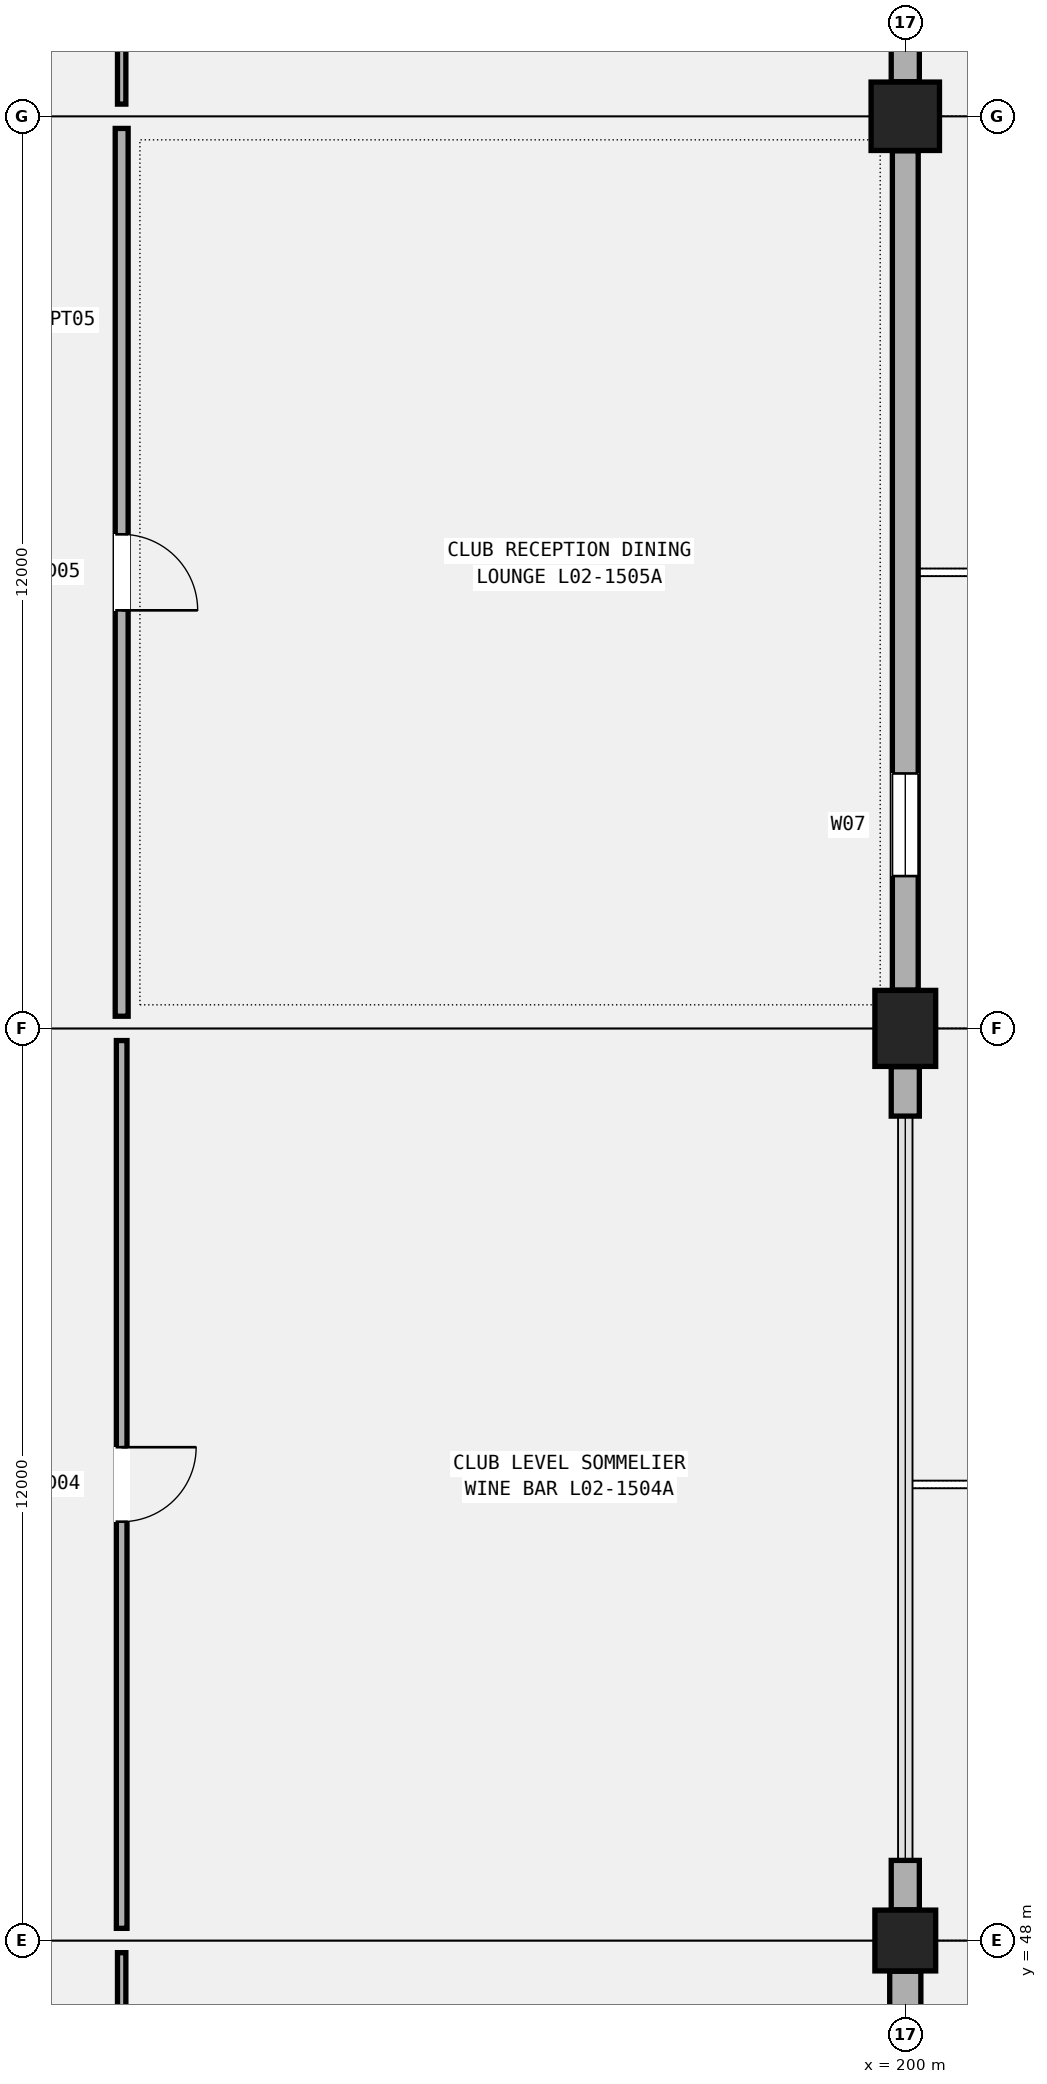
"""IFC4 building model, lengths in metres.
Left out: names, types, materials, properties, quantities, classifications, styles, units other than length and angle.
Written with IfcOpenShell. Run it as: python <this file> out.ifc"""

import sys

from ifc_helpers import new_model, si_unit, direction, frame, frame_2d, origin, origin_2d, place, context, subcontext, project, spatial, rectangle, extrude, element, fill, save


model = new_model("IFC4")
c1 = context("Model", 3, precision=1e-05, world=origin(), true_north=direction((0.0, 1.0)))
c2 = subcontext(c1, "Body", "Model", "MODEL_VIEW")
j1 = project(units=[si_unit("LENGTHUNIT", "METRE"), si_unit("PLANEANGLEUNIT", "RADIAN")], contexts=[c1])
p1 = place(None, origin())
s1 = spatial("IfcSite", under=j1, at=p1, CompositionType="ELEMENT")
p2 = place(p1, origin())
s2 = spatial("IfcBuilding", under=s1, at=p2, CompositionType="ELEMENT")
p3 = place(p2, frame((0.0, 0.0, 10.2)))
s3 = spatial("IfcBuildingStorey", under=s2, at=p3, CompositionType="ELEMENT", Elevation=10.2)
p4 = place(p3, frame((200.0, 48.0, 0.0), z_axis=(0.0, 0.0, 1.0), x_axis=(1.0, 0.0, 0.0)))
e1 = element("IfcColumn", 1, at=p4, inside=s3, PredefinedType="COLUMN", context=c2, shape_type="SweptSolid", body=[
    extrude(rectangle(XDim=0.8, YDim=0.8, at=origin_2d()), origin(), (0.0, 0.0, 1.0), 5.1),
])
p5 = place(p3, frame((200.0, 60.0, 0.0), z_axis=(0.0, 0.0, 1.0), x_axis=(1.0, 0.0, 0.0)))
e2 = element("IfcColumn", 2, at=p5, inside=s3, PredefinedType="COLUMN", context=c2, shape_type="SweptSolid", body=[
    extrude(rectangle(XDim=0.8, YDim=1.0, at=origin_2d()), origin(), (0.0, 0.0, 1.0), 5.1),
])
p6 = place(p3, frame((200.0, 72.0, 0.0), z_axis=(0.0, 0.0, 1.0), x_axis=(1.0, 0.0, 0.0)))
e3 = element("IfcColumn", 3, at=p6, inside=s3, PredefinedType="COLUMN", context=c2, shape_type="SweptSolid", body=[
    extrude(rectangle(XDim=0.9, YDim=0.9, at=origin_2d()), origin(), (0.0, 0.0, 1.0), 5.1),
])
p7 = place(p3, frame((200.0, 36.454, 0.0), z_axis=(0.0, 0.0, 1.0), x_axis=(0.0, 1.0, 0.0)))
e4 = element("IfcWall", 4, at=p7, inside=s3, PredefinedType="SOLIDWALL", context=c2, shape_type="SweptSolid", body=[
    extrude(rectangle(XDim=11.142, YDim=0.41, at=frame_2d((5.571, 0.0))), origin(), (0.0, 0.0, 1.0), 4.12),
])
p8 = place(p7, frame((1.5, 0.0, 0.95)))
e5 = element("IfcOpeningElement", 5, at=p8, cuts=e4, PredefinedType="OPENING", context=c2, shape_type="SweptSolid", body=[
    extrude(rectangle(XDim=1.2, YDim=2.3, at=frame_2d((0.6, 1.15))), frame((0.0, 0.215, 0.0), z_axis=(0.0, -1.0, 0.0), x_axis=(1.0, 0.0, 0.0)), (0.0, 0.0, 1.0), 0.43),
])
p9 = place(p3, frame((200.0, 48.404, 0.0), z_axis=(0.0, 0.0, 1.0), x_axis=(0.0, 1.0, 0.0)))
e6 = element("IfcWall", 6, at=p9, inside=s3, PredefinedType="SOLIDWALL", context=c2, shape_type="SweptSolid", body=[
    extrude(rectangle(XDim=0.65, YDim=0.37, at=frame_2d((0.325, 0.0))), origin(), (0.0, 0.0, 1.0), 4.232),
])
p10 = place(p3, frame((200.0, 58.846, 0.0), z_axis=(0.0, 0.0, 1.0), x_axis=(0.0, 1.0, 0.0)))
e7 = element("IfcWall", 7, at=p10, inside=s3, PredefinedType="SOLIDWALL", context=c2, shape_type="SweptSolid", body=[
    extrude(rectangle(XDim=0.65, YDim=0.37, at=frame_2d((0.325, 0.0))), origin(), (0.0, 0.0, 1.0), 4.232),
])
p11 = place(p3, frame((200.0, 60.504, 0.0), z_axis=(0.0, 0.0, 1.0), x_axis=(0.0, 1.0, 0.0)))
e8 = element("IfcWall", 8, at=p11, inside=s3, PredefinedType="SOLIDWALL", context=c2, shape_type="SweptSolid", body=[
    extrude(rectangle(XDim=11.042, YDim=0.34, at=frame_2d((5.521, 0.0))), origin(), (0.0, 0.0, 1.0), 4.02),
])
p12 = place(p11, frame((1.5, 0.0, 0.95)))
e9 = element("IfcOpeningElement", 9, at=p12, cuts=e8, PredefinedType="OPENING", context=c2, shape_type="SweptSolid", body=[
    extrude(rectangle(XDim=1.35, YDim=2.0, at=frame_2d((0.675, 1.0))), frame((0.0, 0.18, 0.0), z_axis=(0.0, -1.0, 0.0), x_axis=(1.0, 0.0, 0.0)), (0.0, 0.0, 1.0), 0.36),
])
p13 = place(p3, frame((200.0, 72.454, 0.0), z_axis=(0.0, 0.0, 1.0), x_axis=(0.0, 1.0, 0.0)))
e10 = element("IfcWall", 10, at=p13, inside=s3, PredefinedType="SOLIDWALL", context=c2, shape_type="SweptSolid", body=[
    extrude(rectangle(XDim=0.65, YDim=0.37, at=frame_2d((0.325, 0.0))), origin(), (0.0, 0.0, 1.0), 4.12),
])
p14 = place(p3, frame((189.69, 38.12, 0.0), z_axis=(0.0, 0.0, 1.0), x_axis=(0.0, 1.0, 0.0)))
e11 = element("IfcWall", 11, at=p14, inside=s3, PredefinedType="PARTITIONING", context=c2, shape_type="SweptSolid", body=[
    extrude(rectangle(XDim=9.72, YDim=0.11, at=frame_2d((4.86, 0.0))), origin(), (0.0, 0.0, 1.0), 4.22),
])
p15 = place(p14, frame((5.335, 0.0, 0.0), z_axis=(0.0, 0.0, 1.0), x_axis=(-1.0, 0.0, 0.0)))
e12 = element("IfcOpeningElement", 12, at=p15, cuts=e11, PredefinedType="OPENING", context=c2, shape_type="SweptSolid", body=[
    extrude(rectangle(XDim=0.95, YDim=2.12, at=frame_2d((0.475, 1.06))), frame((0.0, 0.065, 0.0), z_axis=(0.0, -1.0, 0.0), x_axis=(1.0, 0.0, 0.0)), (0.0, 0.0, 1.0), 0.13),
])
p16 = place(p3, frame((189.69, 48.16, 0.0), z_axis=(0.0, 0.0, 1.0), x_axis=(0.0, 1.0, 0.0)))
e13 = element("IfcWall", 13, at=p16, inside=s3, PredefinedType="PARTITIONING", context=c2, shape_type="SweptSolid", body=[
    extrude(rectangle(XDim=11.68, YDim=0.14, at=frame_2d((5.84, 0.0))), origin(), (0.0, 0.0, 1.0), 4.22),
])
p17 = place(p16, frame((6.33, 0.0, 0.0), z_axis=(0.0, 0.0, 1.0), x_axis=(-1.0, 0.0, 0.0)))
e14 = element("IfcOpeningElement", 14, at=p17, cuts=e13, PredefinedType="OPENING", context=c2, shape_type="SweptSolid", body=[
    extrude(rectangle(XDim=0.98, YDim=2.1, at=frame_2d((0.49, 1.05))), frame((0.0, 0.08, 0.0), z_axis=(0.0, -1.0, 0.0), x_axis=(1.0, 0.0, 0.0)), (0.0, 0.0, 1.0), 0.16),
])
p18 = place(p3, frame((189.69, 60.16, 0.0), z_axis=(0.0, 0.0, 1.0), x_axis=(0.0, 1.0, 0.0)))
e15 = element("IfcWall", 15, at=p18, inside=s3, PredefinedType="PARTITIONING", context=c2, shape_type="SweptSolid", body=[
    extrude(rectangle(XDim=11.68, YDim=0.17, at=frame_2d((5.84, 0.0))), origin(), (0.0, 0.0, 1.0), 4.22),
])
p19 = place(p18, frame((6.34, 0.0, 0.0), z_axis=(0.0, 0.0, 1.0), x_axis=(-1.0, 0.0, 0.0)))
e16 = element("IfcOpeningElement", 16, at=p19, cuts=e15, PredefinedType="OPENING", context=c2, shape_type="SweptSolid", body=[
    extrude(rectangle(XDim=1.0, YDim=2.14, at=frame_2d((0.5, 1.07))), frame((0.0, 0.095, 0.0), z_axis=(0.0, -1.0, 0.0), x_axis=(1.0, 0.0, 0.0)), (0.0, 0.0, 1.0), 0.19),
])
p20 = place(p3, frame((189.69, 72.16, 0.0), z_axis=(0.0, 0.0, 1.0), x_axis=(0.0, 1.0, 0.0)))
e17 = element("IfcWall", 17, at=p20, inside=s3, PredefinedType="PARTITIONING", context=c2, shape_type="SweptSolid", body=[
    extrude(rectangle(XDim=11.68, YDim=0.11, at=frame_2d((5.84, 0.0))), origin(), (0.0, 0.0, 1.0), 4.22),
])
p21 = place(p20, frame((6.355, 0.0, 0.0), z_axis=(0.0, 0.0, 1.0), x_axis=(-1.0, 0.0, 0.0)))
e18 = element("IfcOpeningElement", 18, at=p21, cuts=e17, PredefinedType="OPENING", context=c2, shape_type="SweptSolid", body=[
    extrude(rectangle(XDim=1.03, YDim=2.12, at=frame_2d((0.515, 1.06))), frame((0.0, 0.065, 0.0), z_axis=(0.0, -1.0, 0.0), x_axis=(1.0, 0.0, 0.0)), (0.0, 0.0, 1.0), 0.13),
])
p22 = place(p12, origin())
e19 = element("IfcWindow", 19, at=p22, inside=s3, PartitioningType="SINGLE_PANEL", PredefinedType="WINDOW", context=c2, shape_type="SweptSolid", body=[
    extrude(rectangle(XDim=1.35, YDim=2.0, at=frame_2d((0.675, 1.0))), frame((0.0, 0.03, 0.0), z_axis=(0.0, -1.0, 0.0), x_axis=(1.0, 0.0, 0.0)), (0.0, 0.0, 1.0), 0.06),
])
fill(e9, e19)
p23 = place(p17, origin())
e20 = element("IfcDoor", 20, at=p23, inside=s3, OperationType="SINGLE_SWING_LEFT", PredefinedType="DOOR", context=c2, shape_type="SweptSolid", body=[
    extrude(rectangle(XDim=0.98, YDim=2.1, at=frame_2d((0.49, 1.05))), frame((0.0, 0.025, 0.0), z_axis=(0.0, -1.0, 0.0), x_axis=(1.0, 0.0, 0.0)), (0.0, 0.0, 1.0), 0.05),
])
fill(e14, e20)
p24 = place(p19, origin())
e21 = element("IfcDoor", 21, at=p24, inside=s3, OperationType="SINGLE_SWING_RIGHT", PredefinedType="DOOR", context=c2, shape_type="SweptSolid", body=[
    extrude(rectangle(XDim=1.0, YDim=2.14, at=frame_2d((0.5, 1.07))), frame((0.0, 0.025, 0.0), z_axis=(0.0, -1.0, 0.0), x_axis=(1.0, 0.0, 0.0)), (0.0, 0.0, 1.0), 0.05),
])
fill(e16, e21)
save(model, sys.argv[1])
